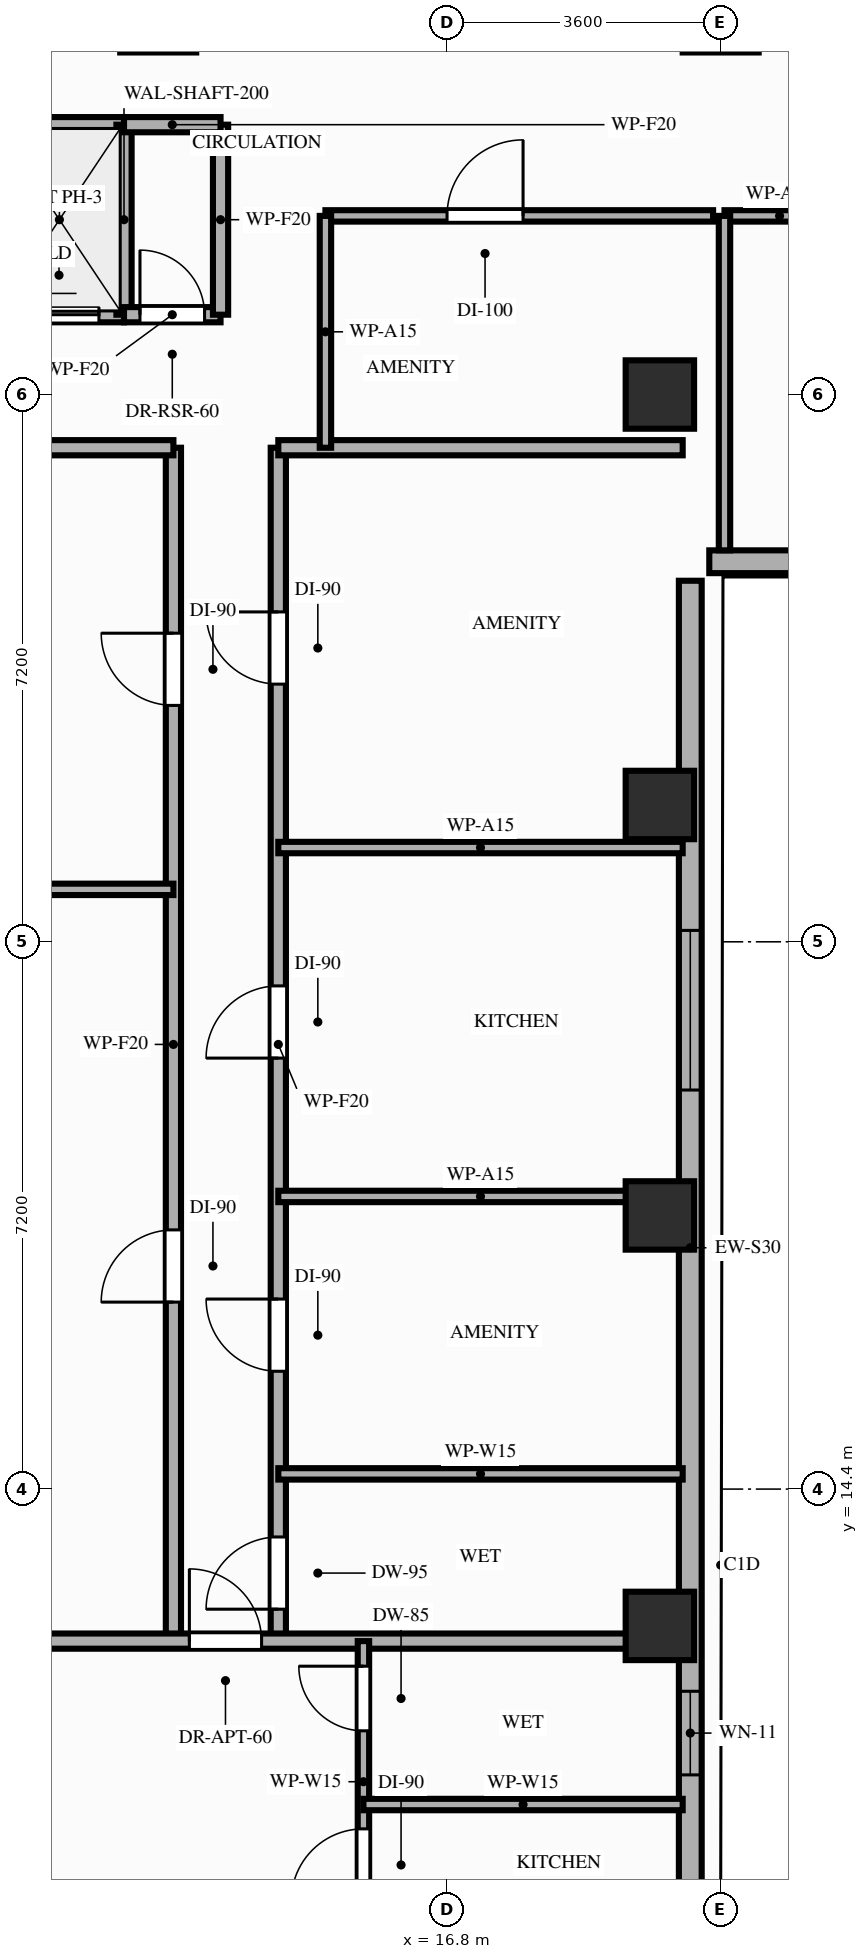
"""IFC4 building model, lengths in metres.
Left out: names, types, materials, properties, quantities, classifications, styles, units other than length and angle.
Written with IfcOpenShell. Run it as: python <this file> out.ifc"""

import sys

from ifc_helpers import new_model, si_unit, direction, frame, frame_2d, origin, origin_2d, place, context, subcontext, project, spatial, rectangle, extrude, element, fill, save


model = new_model("IFC4")
c1 = context("Model", 3, precision=1e-05, world=origin(), true_north=direction((0.0, 1.0)))
c2 = subcontext(c1, "Body", "Model", "MODEL_VIEW")
j1 = project(units=[si_unit("LENGTHUNIT", "METRE"), si_unit("PLANEANGLEUNIT", "RADIAN")], contexts=[c1])
p1 = place(None, origin())
s1 = spatial("IfcSite", under=j1, at=p1, CompositionType="ELEMENT")
p2 = place(p1, origin())
s2 = spatial("IfcBuilding", under=s1, at=p2, CompositionType="ELEMENT")
p3 = place(p2, frame((0.0, 0.0, 163.2)))
s3 = spatial("IfcBuildingStorey", under=s2, at=p3, CompositionType="ELEMENT", Elevation=163.2)
for number, where, z_axis, x_axis in (
    (1, (19.6, 12.6, 0.0), (0.0, 0.0, 1.0), (1.0, 0.0, 0.0)),
    (2, (19.6, 18.0, 0.0), (0.0, 0.0, 1.0), (1.0, 0.0, 0.0)),
    (3, (19.6, 23.4, 0.0), (0.0, 0.0, 1.0), (1.0, 0.0, 0.0)),
    (4, (19.6, 28.8, 0.0), (0.0, 0.0, 1.0), (1.0, 0.0, 0.0)),
):
    element("IfcColumn", number, at=place(p3, frame(where, z_axis=z_axis, x_axis=x_axis)), inside=s3, PredefinedType="COLUMN", context=c2, shape_type="SweptSolid", body=[
        extrude(rectangle(XDim=0.9, YDim=0.9, at=origin_2d()), origin(), (0.0, 0.0, 1.0), 3.2),
    ])
p4 = place(p3, frame((20.0, 8.8, 0.0), z_axis=(0.0, 0.0, 1.0), x_axis=(0.0, 1.0, 0.0)))
e5 = element("IfcWall", 5, at=p4, inside=s3, PredefinedType="STANDARD", context=c2, shape_type="SweptSolid", body=[
    extrude(rectangle(XDim=17.55, YDim=0.3, at=frame_2d((8.775, 0.0))), origin(), (0.0, 0.0, 1.0), 2.45),
])
p5 = place(p4, frame((1.84, 0.0, 0.85)))
e6 = element("IfcOpeningElement", 6, at=p5, cuts=e5, PredefinedType="OPENING", context=c2, shape_type="SweptSolid", body=[
    extrude(rectangle(XDim=1.1, YDim=1.35, at=frame_2d((0.55, 0.675))), frame((0.0, 0.16, 0.0), z_axis=(0.0, -1.0, 0.0), x_axis=(1.0, 0.0, 0.0)), (0.0, 0.0, 1.0), 0.32),
])
p6 = place(p4, frame((10.85, 0.0, 0.85)))
e7 = element("IfcOpeningElement", 7, at=p6, cuts=e5, PredefinedType="OPENING", context=c2, shape_type="SweptSolid", body=[
    extrude(rectangle(XDim=2.1, YDim=1.35, at=frame_2d((1.05, 0.675))), frame((0.0, 0.16, 0.0), z_axis=(0.0, -1.0, 0.0), x_axis=(1.0, 0.0, 0.0)), (0.0, 0.0, 1.0), 0.32),
])
p7 = place(p3, frame((20.25, 26.6, 0.0), z_axis=(0.0, 0.0, 1.0), x_axis=(1.0, 0.0, 0.0)))
e8 = element("IfcWall", 8, at=p7, inside=s3, PredefinedType="STANDARD", context=c2, shape_type="SweptSolid", body=[
    extrude(rectangle(XDim=10.55, YDim=0.3, at=frame_2d((5.275, 0.0))), origin(), (0.0, 0.0, 1.0), 3.02),
])
p8 = place(p3, frame((7.0, 29.85, 0.0), z_axis=(0.0, 0.0, 1.0), x_axis=(1.0, 0.0, 0.0)))
e9 = element("IfcWall", 9, at=p8, inside=s3, PredefinedType="MOVABLE", context=c2, shape_type="SweptSolid", body=[
    extrude(rectangle(XDim=5.55, YDim=0.2, at=frame_2d((2.775, 0.0))), origin(), (0.0, 0.0, 1.0), 3.02),
])
p9 = place(p8, frame((0.38, 0.0, 0.0)))
e10 = element("IfcOpeningElement", 10, at=p9, cuts=e9, PredefinedType="OPENING", context=c2, shape_type="SweptSolid", body=[
    extrude(rectangle(XDim=1.05, YDim=2.15, at=frame_2d((0.525, 1.075))), frame((0.0, 0.11, 0.0), z_axis=(0.0, -1.0, 0.0), x_axis=(1.0, 0.0, 0.0)), (0.0, 0.0, 1.0), 0.22),
])
p10 = place(p8, frame((2.28, 0.0, 0.0)))
e11 = element("IfcOpeningElement", 11, at=p10, cuts=e9, PredefinedType="OPENING", context=c2, shape_type="SweptSolid", body=[
    extrude(rectangle(XDim=1.05, YDim=2.15, at=frame_2d((0.525, 1.075))), frame((0.0, 0.11, 0.0), z_axis=(0.0, -1.0, 0.0), x_axis=(1.0, 0.0, 0.0)), (0.0, 0.0, 1.0), 0.22),
])
p11 = place(p8, frame((4.17, 0.0, 0.0)))
e12 = element("IfcOpeningElement", 12, at=p11, cuts=e9, PredefinedType="OPENING", context=c2, shape_type="SweptSolid", body=[
    extrude(rectangle(XDim=1.05, YDim=2.15, at=frame_2d((0.525, 1.075))), frame((0.0, 0.11, 0.0), z_axis=(0.0, -1.0, 0.0), x_axis=(1.0, 0.0, 0.0)), (0.0, 0.0, 1.0), 0.22),
])
p12 = place(p3, frame((7.0, 32.35, 0.0), z_axis=(0.0, 0.0, 1.0), x_axis=(1.0, 0.0, 0.0)))
e13 = element("IfcWall", 13, at=p12, inside=s3, PredefinedType="MOVABLE", context=c2, shape_type="SweptSolid", body=[
    extrude(rectangle(XDim=5.55, YDim=0.2, at=frame_2d((2.775, 0.0))), origin(), (0.0, 0.0, 1.0), 3.02),
])
p13 = place(p3, frame((12.55, 29.85, 0.0), z_axis=(0.0, 0.0, 1.0), x_axis=(0.0, 1.0, 0.0)))
e14 = element("IfcWall", 14, at=p13, inside=s3, PredefinedType="MOVABLE", context=c2, shape_type="SweptSolid", body=[
    extrude(rectangle(XDim=2.5, YDim=0.2, at=frame_2d((1.25, 0.0))), origin(), (0.0, 0.0, 1.0), 3.02),
])
p14 = place(p3, frame((12.55, 29.85, 0.0), z_axis=(0.0, 0.0, 1.0), x_axis=(1.0, 0.0, 0.0)))
e15 = element("IfcWall", 15, at=p14, inside=s3, PredefinedType="PARTITIONING", context=c2, shape_type="SweptSolid", body=[
    extrude(rectangle(XDim=1.27, YDim=0.2, at=frame_2d((0.635, 0.0))), origin(), (0.0, 0.0, 1.0), 3.02),
])
p15 = place(p14, frame((0.21, 0.0, 0.0)))
e16 = element("IfcOpeningElement", 16, at=p15, cuts=e15, PredefinedType="OPENING", context=c2, shape_type="SweptSolid", body=[
    extrude(rectangle(XDim=0.85, YDim=2.05, at=frame_2d((0.425, 1.025))), frame((0.0, 0.11, 0.0), z_axis=(0.0, -1.0, 0.0), x_axis=(1.0, 0.0, 0.0)), (0.0, 0.0, 1.0), 0.22),
])
p16 = place(p3, frame((13.82, 29.85, 0.0), z_axis=(0.0, 0.0, 1.0), x_axis=(0.0, 1.0, 0.0)))
e17 = element("IfcWall", 17, at=p16, inside=s3, PredefinedType="PARTITIONING", context=c2, shape_type="SweptSolid", body=[
    extrude(rectangle(XDim=2.5, YDim=0.2, at=frame_2d((1.25, 0.0))), origin(), (0.0, 0.0, 1.0), 3.02),
])
p17 = place(p3, frame((12.55, 32.35, 0.0), z_axis=(0.0, 0.0, 1.0), x_axis=(1.0, 0.0, 0.0)))
e18 = element("IfcWall", 18, at=p17, inside=s3, PredefinedType="PARTITIONING", context=c2, shape_type="SweptSolid", body=[
    extrude(rectangle(XDim=1.27, YDim=0.2, at=frame_2d((0.635, 0.0))), origin(), (0.0, 0.0, 1.0), 3.02),
])
p18 = place(p3, frame((13.2, 12.4, 0.0), z_axis=(0.0, 0.0, 1.0), x_axis=(0.0, 1.0, 0.0)))
e19 = element("IfcWall", 19, at=p18, inside=s3, PredefinedType="PARTITIONING", context=c2, shape_type="SweptSolid", body=[
    extrude(rectangle(XDim=15.7, YDim=0.2, at=frame_2d((7.85, 0.0))), origin(), (0.0, 0.0, 1.0), 2.45),
])
p19 = place(p18, frame((4.46, 0.0, 0.0)))
e20 = element("IfcOpeningElement", 20, at=p19, cuts=e19, PredefinedType="OPENING", context=c2, shape_type="SweptSolid", body=[
    extrude(rectangle(XDim=0.95, YDim=2.15, at=frame_2d((0.475, 1.075))), frame((0.0, 0.11, 0.0), z_axis=(0.0, -1.0, 0.0), x_axis=(1.0, 0.0, 0.0)), (0.0, 0.0, 1.0), 0.22),
])
p20 = place(p18, frame((12.31, 0.0, 0.0)))
e21 = element("IfcOpeningElement", 21, at=p20, cuts=e19, PredefinedType="OPENING", context=c2, shape_type="SweptSolid", body=[
    extrude(rectangle(XDim=0.95, YDim=2.15, at=frame_2d((0.475, 1.075))), frame((0.0, 0.11, 0.0), z_axis=(0.0, -1.0, 0.0), x_axis=(1.0, 0.0, 0.0)), (0.0, 0.0, 1.0), 0.22),
])
p21 = place(p3, frame((14.58, 12.4, 0.0), z_axis=(0.0, 0.0, 1.0), x_axis=(0.0, 1.0, 0.0)))
e22 = element("IfcWall", 22, at=p21, inside=s3, PredefinedType="PARTITIONING", context=c2, shape_type="SweptSolid", body=[
    extrude(rectangle(XDim=15.7, YDim=0.2, at=frame_2d((7.85, 0.0))), origin(), (0.0, 0.0, 1.0), 2.45),
])
p22 = place(p21, frame((0.42, 0.0, 0.0)))
e23 = element("IfcOpeningElement", 23, at=p22, cuts=e22, PredefinedType="OPENING", context=c2, shape_type="SweptSolid", body=[
    extrude(rectangle(XDim=0.95, YDim=2.1, at=frame_2d((0.475, 1.05))), frame((0.0, 0.11, 0.0), z_axis=(0.0, -1.0, 0.0), x_axis=(1.0, 0.0, 0.0)), (0.0, 0.0, 1.0), 0.22),
])
p23 = place(p21, frame((3.55, 0.0, 0.0)))
e24 = element("IfcOpeningElement", 24, at=p23, cuts=e22, PredefinedType="OPENING", context=c2, shape_type="SweptSolid", body=[
    extrude(rectangle(XDim=0.95, YDim=2.15, at=frame_2d((0.475, 1.075))), frame((0.0, 0.11, 0.0), z_axis=(0.0, -1.0, 0.0), x_axis=(1.0, 0.0, 0.0)), (0.0, 0.0, 1.0), 0.22),
])
p24 = place(p21, frame((7.67, 0.0, 0.0)))
e25 = element("IfcOpeningElement", 25, at=p24, cuts=e22, PredefinedType="OPENING", context=c2, shape_type="SweptSolid", body=[
    extrude(rectangle(XDim=0.95, YDim=2.15, at=frame_2d((0.475, 1.075))), frame((0.0, 0.11, 0.0), z_axis=(0.0, -1.0, 0.0), x_axis=(1.0, 0.0, 0.0)), (0.0, 0.0, 1.0), 0.22),
])
p25 = place(p21, frame((12.59, 0.0, 0.0)))
e26 = element("IfcOpeningElement", 26, at=p25, cuts=e22, PredefinedType="OPENING", context=c2, shape_type="SweptSolid", body=[
    extrude(rectangle(XDim=0.95, YDim=2.15, at=frame_2d((0.475, 1.075))), frame((0.0, 0.11, 0.0), z_axis=(0.0, -1.0, 0.0), x_axis=(1.0, 0.0, 0.0)), (0.0, 0.0, 1.0), 0.22),
])
p26 = place(p3, frame((3.9, 12.4, 0.0), z_axis=(0.0, 0.0, 1.0), x_axis=(1.0, 0.0, 0.0)))
e27 = element("IfcWall", 27, at=p26, inside=s3, PredefinedType="PARTITIONING", context=c2, shape_type="SweptSolid", body=[
    extrude(rectangle(XDim=16.0, YDim=0.2, at=frame_2d((8.0, 0.0))), origin(), (0.0, 0.0, 1.0), 2.45),
])
p27 = place(p26, frame((9.51, 0.0, 0.0)))
e28 = element("IfcOpeningElement", 28, at=p27, cuts=e27, PredefinedType="OPENING", context=c2, shape_type="SweptSolid", body=[
    extrude(rectangle(XDim=0.95, YDim=2.15, at=frame_2d((0.475, 1.075))), frame((0.0, 0.11, 0.0), z_axis=(0.0, -1.0, 0.0), x_axis=(1.0, 0.0, 0.0)), (0.0, 0.0, 1.0), 0.22),
])
p28 = place(p3, frame((6.0, 28.1, 0.0), z_axis=(0.0, 0.0, 1.0), x_axis=(1.0, 0.0, 0.0)))
e29 = element("IfcWall", 29, at=p28, inside=s3, PredefinedType="PARTITIONING", context=c2, shape_type="SweptSolid", body=[
    extrude(rectangle(XDim=7.2, YDim=0.2, at=frame_2d((3.6, 0.0))), origin(), (0.0, 0.0, 1.0), 3.02),
])
p29 = place(p3, frame((14.58, 28.1, 0.0), z_axis=(0.0, 0.0, 1.0), x_axis=(1.0, 0.0, 0.0)))
e30 = element("IfcWall", 30, at=p29, inside=s3, PredefinedType="PARTITIONING", context=c2, shape_type="SweptSolid", body=[
    extrude(rectangle(XDim=5.32, YDim=0.2, at=frame_2d((2.66, 0.0))), origin(), (0.0, 0.0, 1.0), 2.45),
])
p30 = place(p3, frame((15.2, 31.15, 0.0), z_axis=(0.0, 0.0, 1.0), x_axis=(1.0, 0.0, 0.0)))
e31 = element("IfcWall", 31, at=p30, inside=s3, PredefinedType="PARTITIONING", context=c2, shape_type="SweptSolid", body=[
    extrude(rectangle(XDim=5.1, YDim=0.15, at=frame_2d((2.55, 0.0))), origin(), (0.0, 0.0, 1.0), 2.45),
])
p31 = place(p30, frame((1.6, 0.0, 0.0)))
e32 = element("IfcOpeningElement", 32, at=p31, cuts=e31, PredefinedType="OPENING", context=c2, shape_type="SweptSolid", body=[
    extrude(rectangle(XDim=1.0, YDim=2.15, at=frame_2d((0.5, 1.075))), frame((0.0, 0.085, 0.0), z_axis=(0.0, -1.0, 0.0), x_axis=(1.0, 0.0, 0.0)), (0.0, 0.0, 1.0), 0.17),
])
p32 = place(p3, frame((15.2, 28.1, 0.0), z_axis=(0.0, 0.0, 1.0), x_axis=(0.0, 1.0, 0.0)))
e33 = element("IfcWall", 33, at=p32, inside=s3, PredefinedType="PARTITIONING", context=c2, shape_type="SweptSolid", body=[
    extrude(rectangle(XDim=3.05, YDim=0.15, at=frame_2d((1.525, 0.0))), origin(), (0.0, 0.0, 1.0), 2.45),
])
p33 = place(p3, frame((15.7, 8.7, 0.0), z_axis=(0.0, 0.0, 1.0), x_axis=(0.0, 1.0, 0.0)))
e34 = element("IfcWall", 34, at=p33, inside=s3, PredefinedType="PARTITIONING", context=c2, shape_type="SweptSolid", body=[
    extrude(rectangle(XDim=3.7, YDim=0.15, at=frame_2d((1.85, 0.0))), origin(), (0.0, 0.0, 1.0), 2.45),
])
p34 = place(p33, frame((0.28, 0.0, 0.0)))
e35 = element("IfcOpeningElement", 35, at=p34, cuts=e34, PredefinedType="OPENING", context=c2, shape_type="SweptSolid", body=[
    extrude(rectangle(XDim=0.95, YDim=2.15, at=frame_2d((0.475, 1.075))), frame((0.0, 0.085, 0.0), z_axis=(0.0, -1.0, 0.0), x_axis=(1.0, 0.0, 0.0)), (0.0, 0.0, 1.0), 0.17),
])
p35 = place(p33, frame((2.52, 0.0, 0.0)))
e36 = element("IfcOpeningElement", 36, at=p35, cuts=e34, PredefinedType="OPENING", context=c2, shape_type="SweptSolid", body=[
    extrude(rectangle(XDim=0.85, YDim=2.1, at=frame_2d((0.425, 1.05))), frame((0.0, 0.085, 0.0), z_axis=(0.0, -1.0, 0.0), x_axis=(1.0, 0.0, 0.0)), (0.0, 0.0, 1.0), 0.17),
])
p36 = place(p3, frame((15.7, 10.25, 0.0), z_axis=(0.0, 0.0, 1.0), x_axis=(1.0, 0.0, 0.0)))
e37 = element("IfcWall", 37, at=p36, inside=s3, PredefinedType="PARTITIONING", context=c2, shape_type="SweptSolid", body=[
    extrude(rectangle(XDim=4.2, YDim=0.15, at=frame_2d((2.1, 0.0))), origin(), (0.0, 0.0, 1.0), 3.02),
])
p37 = place(p3, frame((3.9, 22.29, 0.0), z_axis=(0.0, 0.0, 1.0), x_axis=(1.0, 0.0, 0.0)))
e38 = element("IfcWall", 38, at=p37, inside=s3, PredefinedType="PARTITIONING", context=c2, shape_type="SweptSolid", body=[
    extrude(rectangle(XDim=9.3, YDim=0.15, at=frame_2d((4.65, 0.0))), origin(), (0.0, 0.0, 1.0), 2.45),
])
for number, where, z_axis, x_axis in (
    (39, (14.58, 14.6, 0.0), (0.0, 0.0, 1.0), (1.0, 0.0, 0.0)),
    (40, (14.58, 18.25, 0.0), (0.0, 0.0, 1.0), (1.0, 0.0, 0.0)),
    (41, (14.58, 22.84, 0.0), (0.0, 0.0, 1.0), (1.0, 0.0, 0.0)),
):
    element("IfcWall", number, at=place(p3, frame(where, z_axis=z_axis, x_axis=x_axis)), inside=s3, PredefinedType="PARTITIONING", context=c2, shape_type="SweptSolid", body=[
        extrude(rectangle(XDim=5.32, YDim=0.15, at=frame_2d((2.66, 0.0))), origin(), (0.0, 0.0, 1.0), 2.45),
    ])
p38 = place(p3, frame((20.45, 31.15, 0.0), z_axis=(0.0, 0.0, 1.0), x_axis=(1.0, 0.0, 0.0)))
e42 = element("IfcWall", 42, at=p38, inside=s3, PredefinedType="PARTITIONING", context=c2, shape_type="SweptSolid", body=[
    extrude(rectangle(XDim=6.7, YDim=0.15, at=frame_2d((3.35, 0.0))), origin(), (0.0, 0.0, 1.0), 3.02),
])
p39 = place(p38, frame((2.8, 0.0, 0.0)))
e43 = element("IfcOpeningElement", 43, at=p39, cuts=e42, PredefinedType="OPENING", context=c2, shape_type="SweptSolid", body=[
    extrude(rectangle(XDim=1.0, YDim=2.15, at=frame_2d((0.5, 1.075))), frame((0.0, 0.085, 0.0), z_axis=(0.0, -1.0, 0.0), x_axis=(1.0, 0.0, 0.0)), (0.0, 0.0, 1.0), 0.17),
])
p40 = place(p3, frame((20.45, 26.75, 0.0), z_axis=(0.0, 0.0, 1.0), x_axis=(0.0, 1.0, 0.0)))
e44 = element("IfcWall", 44, at=p40, inside=s3, PredefinedType="PARTITIONING", context=c2, shape_type="SweptSolid", body=[
    extrude(rectangle(XDim=4.4, YDim=0.15, at=frame_2d((2.2, 0.0))), origin(), (0.0, 0.0, 1.0), 2.45),
])
p41 = place(p5, origin())
e45 = element("IfcWindow", 45, at=p41, inside=s3, PartitioningType="SINGLE_PANEL", PredefinedType="WINDOW", context=c2, shape_type="SweptSolid", body=[
    extrude(rectangle(XDim=1.1, YDim=1.35, at=frame_2d((0.55, 0.675))), frame((0.0, 0.03, 0.0), z_axis=(0.0, -1.0, 0.0), x_axis=(1.0, 0.0, 0.0)), (0.0, 0.0, 1.0), 0.06),
])
fill(e6, e45)
p42 = place(p6, origin())
e46 = element("IfcWindow", 46, at=p42, inside=s3, PartitioningType="SINGLE_PANEL", PredefinedType="WINDOW", context=c2, shape_type="SweptSolid", body=[
    extrude(rectangle(XDim=2.1, YDim=1.35, at=frame_2d((1.05, 0.675))), frame((0.0, 0.03, 0.0), z_axis=(0.0, -1.0, 0.0), x_axis=(1.0, 0.0, 0.0)), (0.0, 0.0, 1.0), 0.06),
])
fill(e7, e46)
p43 = place(p11, origin())
e47 = element("IfcDoor", 47, at=p43, inside=s3, OperationType="SLIDING_TO_LEFT", PredefinedType="DOOR", context=c2, shape_type="SweptSolid", body=[
    extrude(rectangle(XDim=1.05, YDim=2.15, at=frame_2d((0.525, 1.075))), frame((0.0, 0.025, 0.0), z_axis=(0.0, -1.0, 0.0), x_axis=(1.0, 0.0, 0.0)), (0.0, 0.0, 1.0), 0.05),
])
fill(e12, e47)
p44 = place(p15, origin())
e48 = element("IfcDoor", 48, at=p44, inside=s3, OperationType="SINGLE_SWING_LEFT", PredefinedType="DOOR", context=c2, shape_type="SweptSolid", body=[
    extrude(rectangle(XDim=0.85, YDim=2.05, at=frame_2d((0.425, 1.025))), frame((0.0, 0.025, 0.0), z_axis=(0.0, -1.0, 0.0), x_axis=(1.0, 0.0, 0.0)), (0.0, 0.0, 1.0), 0.05),
])
fill(e16, e48)
p45 = place(p31, origin())
e49 = element("IfcDoor", 49, at=p45, inside=s3, OperationType="SINGLE_SWING_RIGHT", PredefinedType="DOOR", context=c2, shape_type="SweptSolid", body=[
    extrude(rectangle(XDim=1.0, YDim=2.15, at=frame_2d((0.5, 1.075))), frame((0.0, 0.025, 0.0), z_axis=(0.0, -1.0, 0.0), x_axis=(1.0, 0.0, 0.0)), (0.0, 0.0, 1.0), 0.05),
])
fill(e32, e49)
p46 = place(p27, origin())
e50 = element("IfcDoor", 50, at=p46, inside=s3, OperationType="SINGLE_SWING_LEFT", PredefinedType="DOOR", context=c2, shape_type="SweptSolid", body=[
    extrude(rectangle(XDim=0.95, YDim=2.15, at=frame_2d((0.475, 1.075))), frame((0.0, 0.025, 0.0), z_axis=(0.0, -1.0, 0.0), x_axis=(1.0, 0.0, 0.0)), (0.0, 0.0, 1.0), 0.05),
])
fill(e28, e50)
p47 = place(p34, origin())
e51 = element("IfcDoor", 51, at=p47, inside=s3, OperationType="SINGLE_SWING_LEFT", PredefinedType="DOOR", context=c2, shape_type="SweptSolid", body=[
    extrude(rectangle(XDim=0.95, YDim=2.15, at=frame_2d((0.475, 1.075))), frame((0.0, 0.025, 0.0), z_axis=(0.0, -1.0, 0.0), x_axis=(1.0, 0.0, 0.0)), (0.0, 0.0, 1.0), 0.05),
])
fill(e35, e51)
p48 = place(p35, origin())
e52 = element("IfcDoor", 52, at=p48, inside=s3, OperationType="SINGLE_SWING_RIGHT", PredefinedType="DOOR", context=c2, shape_type="SweptSolid", body=[
    extrude(rectangle(XDim=0.85, YDim=2.1, at=frame_2d((0.425, 1.05))), frame((0.0, 0.025, 0.0), z_axis=(0.0, -1.0, 0.0), x_axis=(1.0, 0.0, 0.0)), (0.0, 0.0, 1.0), 0.05),
])
fill(e36, e52)
p49 = place(p19, origin())
e53 = element("IfcDoor", 53, at=p49, inside=s3, OperationType="SINGLE_SWING_LEFT", PredefinedType="DOOR", context=c2, shape_type="SweptSolid", body=[
    extrude(rectangle(XDim=0.95, YDim=2.15, at=frame_2d((0.475, 1.075))), frame((0.0, 0.025, 0.0), z_axis=(0.0, -1.0, 0.0), x_axis=(1.0, 0.0, 0.0)), (0.0, 0.0, 1.0), 0.05),
])
fill(e20, e53)
p50 = place(p20, origin())
e54 = element("IfcDoor", 54, at=p50, inside=s3, OperationType="SINGLE_SWING_RIGHT", PredefinedType="DOOR", context=c2, shape_type="SweptSolid", body=[
    extrude(rectangle(XDim=0.95, YDim=2.15, at=frame_2d((0.475, 1.075))), frame((0.0, 0.025, 0.0), z_axis=(0.0, -1.0, 0.0), x_axis=(1.0, 0.0, 0.0)), (0.0, 0.0, 1.0), 0.05),
])
fill(e21, e54)
p51 = place(p22, origin())
e55 = element("IfcDoor", 55, at=p51, inside=s3, OperationType="SINGLE_SWING_LEFT", PredefinedType="DOOR", context=c2, shape_type="SweptSolid", body=[
    extrude(rectangle(XDim=0.95, YDim=2.1, at=frame_2d((0.475, 1.05))), frame((0.0, 0.025, 0.0), z_axis=(0.0, -1.0, 0.0), x_axis=(1.0, 0.0, 0.0)), (0.0, 0.0, 1.0), 0.05),
])
fill(e23, e55)
p52 = place(p23, origin())
e56 = element("IfcDoor", 56, at=p52, inside=s3, OperationType="SINGLE_SWING_RIGHT", PredefinedType="DOOR", context=c2, shape_type="SweptSolid", body=[
    extrude(rectangle(XDim=0.95, YDim=2.15, at=frame_2d((0.475, 1.075))), frame((0.0, 0.025, 0.0), z_axis=(0.0, -1.0, 0.0), x_axis=(1.0, 0.0, 0.0)), (0.0, 0.0, 1.0), 0.05),
])
fill(e24, e56)
p53 = place(p24, origin())
e57 = element("IfcDoor", 57, at=p53, inside=s3, OperationType="SINGLE_SWING_LEFT", PredefinedType="DOOR", context=c2, shape_type="SweptSolid", body=[
    extrude(rectangle(XDim=0.95, YDim=2.15, at=frame_2d((0.475, 1.075))), frame((0.0, 0.025, 0.0), z_axis=(0.0, -1.0, 0.0), x_axis=(1.0, 0.0, 0.0)), (0.0, 0.0, 1.0), 0.05),
])
fill(e25, e57)
p54 = place(p25, origin())
e58 = element("IfcDoor", 58, at=p54, inside=s3, OperationType="SINGLE_SWING_RIGHT", PredefinedType="DOOR", context=c2, shape_type="SweptSolid", body=[
    extrude(rectangle(XDim=0.95, YDim=2.15, at=frame_2d((0.475, 1.075))), frame((0.0, 0.025, 0.0), z_axis=(0.0, -1.0, 0.0), x_axis=(1.0, 0.0, 0.0)), (0.0, 0.0, 1.0), 0.05),
])
fill(e26, e58)
save(model, sys.argv[1])
